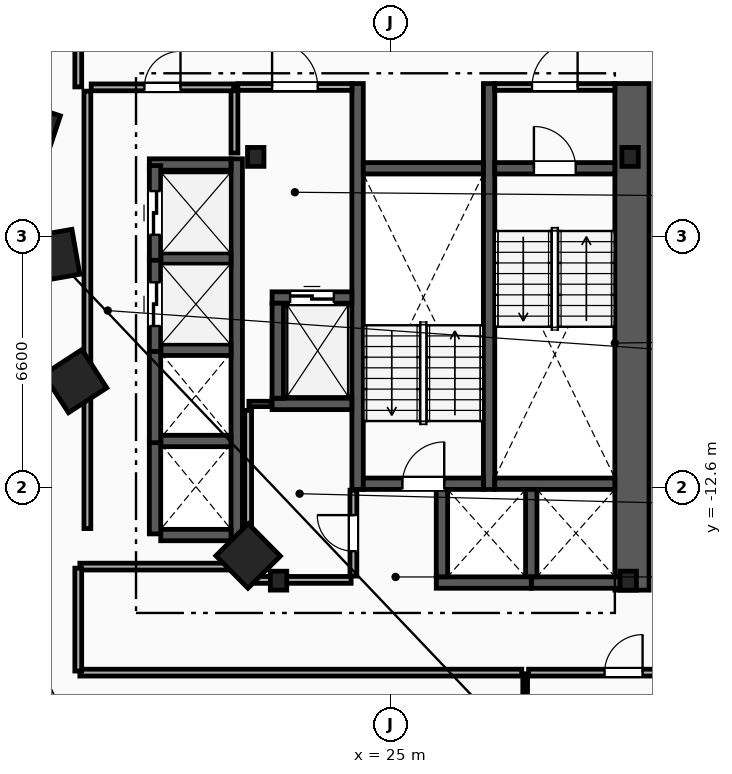
"""IFC4 building model, lengths in metres.
Left out: names, types, materials, properties, quantities, classifications, styles, units other than length and angle.
Written with IfcOpenShell. Run it as: python <this file> out.ifc"""

import sys

from ifc_helpers import new_model, si_unit, direction, frame, frame_2d, origin, origin_2d, place, context, subcontext, project, spatial, rectangle, i_section, extrude, element, fill, save


model = new_model("IFC4")
c1 = context("Model", 3, precision=1e-05, world=origin(), true_north=direction((0.0, 1.0)))
c2 = subcontext(c1, "Body", "Model", "MODEL_VIEW")
j1 = project(units=[si_unit("LENGTHUNIT", "METRE"), si_unit("PLANEANGLEUNIT", "RADIAN")], contexts=[c1])
p1 = place(None, origin())
s1 = spatial("IfcSite", under=j1, at=p1, CompositionType="ELEMENT")
p2 = place(p1, origin())
s2 = spatial("IfcBuilding", under=s1, at=p2, CompositionType="ELEMENT")
p3 = place(p2, frame((0.0, 0.0, 31.6)))
s3 = spatial("IfcBuildingStorey", under=s2, at=p3, CompositionType="ELEMENT", Elevation=31.6)
for number, where, z_axis, x_axis in (
    (1, (31.3, -3.9, 0.0), (0.0, 0.0, 1.0), (1.0, 0.0, 0.0)),
    (2, (21.45, -3.9, 0.0), (0.0, 0.0, 1.0), (1.0, 0.0, 0.0)),
    (3, (22.05, -15.05, 0.0), (0.0, 0.0, 1.0), (1.0, 0.0, 0.0)),
    (4, (31.25, -15.05, 0.0), (0.0, 0.0, 1.0), (1.0, 0.0, 0.0)),
):
    element("IfcColumn", number, at=place(p3, frame(where, z_axis=z_axis, x_axis=x_axis)), inside=s3, PredefinedType="COLUMN", context=c2, shape_type="SweptSolid", body=[
        extrude(i_section(OverallWidth=0.432, OverallDepth=0.498, WebThickness=0.056, FlangeThickness=0.089, FilletRadius=0.018, at=origin_2d()), origin(), (0.0, 0.0, 1.0), 3.8),
    ])
for number, where, z_axis, x_axis in (
    (5, (15.55, -3.2, 0.0), (0.0, 0.0, 1.0), (-0.315, -0.949, 0.0)),
    (6, (16.125, -6.5, 0.0), (0.0, 0.0, 1.0), (0.172, -0.985, 0.0)),
    (7, (16.7, -9.8, 0.0), (0.0, 0.0, 1.0), (0.544, -0.839, 0.0)),
    (8, (21.25, -14.4, 0.0), (0.0, 0.0, 1.0), (0.703, -0.711, 0.0)),
):
    element("IfcColumn", number, at=place(p3, frame(where, z_axis=z_axis, x_axis=x_axis)), inside=s3, PredefinedType="COLUMN", context=c2, shape_type="SweptSolid", body=[
        extrude(rectangle(XDim=1.2, YDim=1.2, at=origin_2d()), origin(), (0.0, 0.0, 1.0), 3.8),
    ])
p4 = place(p3, frame((31.35, -15.3, 0.0), z_axis=(0.0, 0.0, 1.0), x_axis=(0.0, 1.0, 0.0)))
e9 = element("IfcWall", 9, at=p4, inside=s3, PredefinedType="SHEAR", context=c2, shape_type="SweptSolid", body=[
    extrude(rectangle(XDim=13.33, YDim=0.9, at=frame_2d((6.665, 0.0))), origin(), (0.0, 0.0, 1.0), 3.5),
])
for number, where, z_axis, x_axis in (
    (10, (27.59, -12.65, 0.0), (0.0, 0.0, 1.0), (0.0, 1.0, 0.0)),
    (11, (24.13, -12.65, 0.0), (0.0, 0.0, 1.0), (0.0, 1.0, 0.0)),
):
    element("IfcWall", number, at=place(p3, frame(where, z_axis=z_axis, x_axis=x_axis)), inside=s3, PredefinedType="SHEAR", context=c2, shape_type="SweptSolid", body=[
        extrude(rectangle(XDim=10.68, YDim=0.3, at=frame_2d((5.34, 0.0))), origin(), (0.0, 0.0, 1.0), 3.5),
    ])
p5 = place(p3, frame((27.74, -4.2, 0.0), z_axis=(0.0, 0.0, 1.0), x_axis=(1.0, 0.0, 0.0)))
e12 = element("IfcWall", 12, at=p5, inside=s3, PredefinedType="SHEAR", context=c2, shape_type="SweptSolid", body=[
    extrude(rectangle(XDim=3.16, YDim=0.3, at=frame_2d((1.58, 0.0))), origin(), (0.0, 0.0, 1.0), 3.5),
])
p6 = place(p5, frame((1.03, 0.0, 0.0)))
e13 = element("IfcOpeningElement", 13, at=p6, cuts=e12, PredefinedType="OPENING", context=c2, shape_type="SweptSolid", body=[
    extrude(rectangle(XDim=1.1, YDim=2.15, at=frame_2d((0.55, 1.075))), frame((0.0, 0.16, 0.0), z_axis=(0.0, -1.0, 0.0), x_axis=(1.0, 0.0, 0.0)), (0.0, 0.0, 1.0), 0.32),
])
p7 = place(p3, frame((27.74, -12.5, 0.0), z_axis=(0.0, 0.0, 1.0), x_axis=(1.0, 0.0, 0.0)))
e14 = element("IfcWall", 14, at=p7, inside=s3, PredefinedType="SHEAR", context=c2, shape_type="SweptSolid", body=[
    extrude(rectangle(XDim=3.16, YDim=0.3, at=frame_2d((1.58, 0.0))), origin(), (0.0, 0.0, 1.0), 3.5),
])
p8 = place(p3, frame((24.28, -12.5, 0.0), z_axis=(0.0, 0.0, 1.0), x_axis=(1.0, 0.0, 0.0)))
e15 = element("IfcWall", 15, at=p8, inside=s3, PredefinedType="SHEAR", context=c2, shape_type="SweptSolid", body=[
    extrude(rectangle(XDim=3.16, YDim=0.3, at=frame_2d((1.58, 0.0))), origin(), (0.0, 0.0, 1.0), 3.5),
])
p9 = place(p8, frame((1.03, 0.0, 0.0)))
e16 = element("IfcOpeningElement", 16, at=p9, cuts=e15, PredefinedType="OPENING", context=c2, shape_type="SweptSolid", body=[
    extrude(rectangle(XDim=1.1, YDim=2.15, at=frame_2d((0.55, 1.075))), frame((0.0, 0.16, 0.0), z_axis=(0.0, -1.0, 0.0), x_axis=(1.0, 0.0, 0.0)), (0.0, 0.0, 1.0), 0.32),
])
p10 = place(p3, frame((24.28, -4.2, 0.0), z_axis=(0.0, 0.0, 1.0), x_axis=(1.0, 0.0, 0.0)))
e17 = element("IfcWall", 17, at=p10, inside=s3, PredefinedType="SHEAR", context=c2, shape_type="SweptSolid", body=[
    extrude(rectangle(XDim=3.16, YDim=0.3, at=frame_2d((1.58, 0.0))), origin(), (0.0, 0.0, 1.0), 3.5),
])
p11 = place(p3, frame((20.89, -3.8, 0.0), z_axis=(0.0, 0.0, 1.0), x_axis=(0.0, 1.0, 0.0)))
e18 = element("IfcWall", 18, at=p11, inside=s3, PredefinedType="PARTITIONING", context=c2, shape_type="SweptSolid", body=[
    extrude(rectangle(XDim=1.65, YDim=0.18, at=frame_2d((0.825, 0.0))), origin(), (0.0, 0.0, 1.0), 3.5),
])
p12 = place(p3, frame((20.98, -2.06, 0.0), z_axis=(0.0, 0.0, 1.0), x_axis=(1.0, 0.0, 0.0)))
e19 = element("IfcWall", 19, at=p12, inside=s3, PredefinedType="PARTITIONING", context=c2, shape_type="SweptSolid", body=[
    extrude(rectangle(XDim=3.0, YDim=0.18, at=frame_2d((1.5, 0.0))), origin(), (0.0, 0.0, 1.0), 3.5),
])
p13 = place(p12, frame((0.9, 0.0, 0.0)))
e20 = element("IfcOpeningElement", 20, at=p13, cuts=e19, PredefinedType="OPENING", context=c2, shape_type="SweptSolid", body=[
    extrude(rectangle(XDim=1.2, YDim=2.15, at=frame_2d((0.6, 1.075))), frame((0.0, 0.1, 0.0), z_axis=(0.0, -1.0, 0.0), x_axis=(1.0, 0.0, 0.0)), (0.0, 0.0, 1.0), 0.2),
])
p14 = place(p3, frame((27.74, -2.06, 0.0), z_axis=(0.0, 0.0, 1.0), x_axis=(1.0, 0.0, 0.0)))
e21 = element("IfcWall", 21, at=p14, inside=s3, PredefinedType="PARTITIONING", context=c2, shape_type="SweptSolid", body=[
    extrude(rectangle(XDim=3.16, YDim=0.18, at=frame_2d((1.58, 0.0))), origin(), (0.0, 0.0, 1.0), 3.5),
])
p15 = place(p14, frame((0.98, 0.0, 0.0)))
e22 = element("IfcOpeningElement", 22, at=p15, cuts=e21, PredefinedType="OPENING", context=c2, shape_type="SweptSolid", body=[
    extrude(rectangle(XDim=1.2, YDim=2.15, at=frame_2d((0.6, 1.075))), frame((0.0, 0.1, 0.0), z_axis=(0.0, -1.0, 0.0), x_axis=(1.0, 0.0, 0.0)), (0.0, 0.0, 1.0), 0.2),
])
p16 = place(p3, frame((21.88, -7.6, 0.0), z_axis=(0.0, 0.0, 1.0), x_axis=(1.0, 0.0, 0.0)))
e23 = element("IfcWall", 23, at=p16, inside=s3, PredefinedType="SHEAR", context=c2, shape_type="SweptSolid", body=[
    extrude(rectangle(XDim=2.1, YDim=0.3, at=frame_2d((1.05, 0.0))), origin(), (0.0, 0.0, 1.0), 3.5),
])
p17 = place(p16, frame((0.475, 0.0, 0.0)))
e24 = element("IfcOpeningElement", 24, at=p17, cuts=e23, PredefinedType="OPENING", context=c2, shape_type="SweptSolid", body=[
    extrude(rectangle(XDim=1.15, YDim=2.2, at=frame_2d((0.575, 1.1))), frame((0.0, 0.16, 0.0), z_axis=(0.0, -1.0, 0.0), x_axis=(1.0, 0.0, 0.0)), (0.0, 0.0, 1.0), 0.32),
])
p18 = place(p3, frame((21.88, -10.4, 0.0), z_axis=(0.0, 0.0, 1.0), x_axis=(1.0, 0.0, 0.0)))
e25 = element("IfcWall", 25, at=p18, inside=s3, PredefinedType="SHEAR", context=c2, shape_type="SweptSolid", body=[
    extrude(rectangle(XDim=2.1, YDim=0.3, at=frame_2d((1.05, 0.0))), origin(), (0.0, 0.0, 1.0), 3.5),
])
for number, where, z_axis, x_axis in (
    (26, (22.03, -10.25, 0.0), (0.0, 0.0, 1.0), (0.0, 1.0, 0.0)),
    (27, (28.7, -15.1, 0.0), (0.0, 0.0, 1.0), (1.0, 0.0, 0.0)),
):
    element("IfcWall", number, at=place(p3, frame(where, z_axis=z_axis, x_axis=x_axis)), inside=s3, PredefinedType="SHEAR", context=c2, shape_type="SweptSolid", body=[
        extrude(rectangle(XDim=2.5, YDim=0.3, at=frame_2d((1.25, 0.0))), origin(), (0.0, 0.0, 1.0), 3.5),
    ])
p19 = place(p3, frame((28.7, -14.95, 0.0), z_axis=(0.0, 0.0, 1.0), x_axis=(0.0, 1.0, 0.0)))
e28 = element("IfcWall", 28, at=p19, inside=s3, PredefinedType="SHEAR", context=c2, shape_type="SweptSolid", body=[
    extrude(rectangle(XDim=2.3, YDim=0.3, at=frame_2d((1.15, 0.0))), origin(), (0.0, 0.0, 1.0), 3.5),
])
p20 = place(p3, frame((26.2, -15.1, 0.0), z_axis=(0.0, 0.0, 1.0), x_axis=(1.0, 0.0, 0.0)))
e29 = element("IfcWall", 29, at=p20, inside=s3, PredefinedType="SHEAR", context=c2, shape_type="SweptSolid", body=[
    extrude(rectangle(XDim=2.5, YDim=0.3, at=frame_2d((1.25, 0.0))), origin(), (0.0, 0.0, 1.0), 3.5),
])
p21 = place(p3, frame((26.35, -14.95, 0.0), z_axis=(0.0, 0.0, 1.0), x_axis=(0.0, 1.0, 0.0)))
e30 = element("IfcWall", 30, at=p21, inside=s3, PredefinedType="SHEAR", context=c2, shape_type="SweptSolid", body=[
    extrude(rectangle(XDim=2.3, YDim=0.3, at=frame_2d((1.15, 0.0))), origin(), (0.0, 0.0, 1.0), 3.5),
])
p22 = place(p3, frame((20.95, -14.0, 0.0), z_axis=(0.0, 0.0, 1.0), x_axis=(0.0, 1.0, 0.0)))
e31 = element("IfcWall", 31, at=p22, inside=s3, PredefinedType="SHEAR", context=c2, shape_type="SweptSolid", body=[
    extrude(rectangle(XDim=10.05, YDim=0.3, at=frame_2d((5.025, 0.0))), origin(), (0.0, 0.0, 1.0), 3.5),
])
p23 = place(p3, frame((18.95, -13.85, 0.0), z_axis=(0.0, 0.0, 1.0), x_axis=(1.0, 0.0, 0.0)))
e32 = element("IfcWall", 32, at=p23, inside=s3, PredefinedType="SHEAR", context=c2, shape_type="SweptSolid", body=[
    extrude(rectangle(XDim=1.85, YDim=0.3, at=frame_2d((0.925, 0.0))), origin(), (0.0, 0.0, 1.0), 3.5),
])
p24 = place(p3, frame((18.65, -4.1, 0.0), z_axis=(0.0, 0.0, 1.0), x_axis=(1.0, 0.0, 0.0)))
e33 = element("IfcWall", 33, at=p24, inside=s3, PredefinedType="SHEAR", context=c2, shape_type="SweptSolid", body=[
    extrude(rectangle(XDim=2.15, YDim=0.3, at=frame_2d((1.075, 0.0))), origin(), (0.0, 0.0, 1.0), 3.5),
])
for number, where, z_axis, x_axis in (
    (34, (18.95, -11.375, 0.0), (0.0, 0.0, 1.0), (1.0, 0.0, 0.0)),
    (35, (18.95, -8.975, 0.0), (0.0, 0.0, 1.0), (1.0, 0.0, 0.0)),
    (36, (18.95, -6.575, 0.0), (0.0, 0.0, 1.0), (1.0, 0.0, 0.0)),
):
    element("IfcWall", number, at=place(p3, frame(where, z_axis=z_axis, x_axis=x_axis)), inside=s3, PredefinedType="SHEAR", context=c2, shape_type="SweptSolid", body=[
        extrude(rectangle(XDim=1.85, YDim=0.3, at=frame_2d((0.925, 0.0))), origin(), (0.0, 0.0, 1.0), 3.5),
    ])
for number, where, z_axis, x_axis in (
    (37, (18.8, -13.82, 0.0), (0.0, 0.0, 1.0), (0.0, 1.0, 0.0)),
    (38, (18.8, -11.42, 0.0), (0.0, 0.0, 1.0), (0.0, 1.0, 0.0)),
):
    element("IfcWall", number, at=place(p3, frame(where, z_axis=z_axis, x_axis=x_axis)), inside=s3, PredefinedType="SHEAR", context=c2, shape_type="SweptSolid", body=[
        extrude(rectangle(XDim=2.49, YDim=0.3, at=frame_2d((1.245, 0.0))), origin(), (0.0, 0.0, 1.0), 3.5),
    ])
p25 = place(p3, frame((18.8, -9.02, 0.0), z_axis=(0.0, 0.0, 1.0), x_axis=(0.0, 1.0, 0.0)))
e39 = element("IfcWall", 39, at=p25, inside=s3, PredefinedType="SHEAR", context=c2, shape_type="SweptSolid", body=[
    extrude(rectangle(XDim=2.49, YDim=0.3, at=frame_2d((1.245, 0.0))), origin(), (0.0, 0.0, 1.0), 3.5),
])
p26 = place(p25, frame((0.67, 0.0, 0.0)))
e40 = element("IfcOpeningElement", 40, at=p26, cuts=e39, PredefinedType="OPENING", context=c2, shape_type="SweptSolid", body=[
    extrude(rectangle(XDim=1.15, YDim=2.2, at=frame_2d((0.575, 1.1))), frame((0.0, 0.16, 0.0), z_axis=(0.0, -1.0, 0.0), x_axis=(1.0, 0.0, 0.0)), (0.0, 0.0, 1.0), 0.32),
])
p27 = place(p3, frame((18.8, -6.62, 0.0), z_axis=(0.0, 0.0, 1.0), x_axis=(0.0, 1.0, 0.0)))
e41 = element("IfcWall", 41, at=p27, inside=s3, PredefinedType="SHEAR", context=c2, shape_type="SweptSolid", body=[
    extrude(rectangle(XDim=2.49, YDim=0.3, at=frame_2d((1.245, 0.0))), origin(), (0.0, 0.0, 1.0), 3.5),
])
p28 = place(p27, frame((0.67, 0.0, 0.0)))
e42 = element("IfcOpeningElement", 42, at=p28, cuts=e41, PredefinedType="OPENING", context=c2, shape_type="SweptSolid", body=[
    extrude(rectangle(XDim=1.15, YDim=2.2, at=frame_2d((0.575, 1.1))), frame((0.0, 0.16, 0.0), z_axis=(0.0, -1.0, 0.0), x_axis=(1.0, 0.0, 0.0)), (0.0, 0.0, 1.0), 0.32),
])
p29 = place(p3, frame((17.02, -13.68, 0.0), z_axis=(0.0, 0.0, 1.0), x_axis=(0.0, 1.0, 0.0)))
e43 = element("IfcWall", 43, at=p29, inside=s3, PredefinedType="PARTITIONING", context=c2, shape_type="SweptSolid", body=[
    extrude(rectangle(XDim=11.51, YDim=0.18, at=frame_2d((5.755, 0.0))), origin(), (0.0, 0.0, 1.0), 3.5),
])
p30 = place(p3, frame((17.12, -2.07, 0.0), z_axis=(0.0, 0.0, 1.0), x_axis=(1.0, 0.0, 0.0)))
e44 = element("IfcWall", 44, at=p30, inside=s3, PredefinedType="PARTITIONING", context=c2, shape_type="SweptSolid", body=[
    extrude(rectangle(XDim=3.75, YDim=0.18, at=frame_2d((1.875, 0.0))), origin(), (0.0, 0.0, 1.0), 3.5),
])
p31 = place(p30, frame((1.4, 0.0, 0.0)))
e45 = element("IfcOpeningElement", 45, at=p31, cuts=e44, PredefinedType="OPENING", context=c2, shape_type="SweptSolid", body=[
    extrude(rectangle(XDim=0.95, YDim=2.1, at=frame_2d((0.475, 1.05))), frame((0.0, 0.1, 0.0), z_axis=(0.0, -1.0, 0.0), x_axis=(1.0, 0.0, 0.0)), (0.0, 0.0, 1.0), 0.2),
])
p32 = place(p3, frame((21.27, -10.4, 0.0), z_axis=(0.0, 0.0, 1.0), x_axis=(1.0, 0.0, 0.0)))
e46 = element("IfcWall", 46, at=p32, inside=s3, PredefinedType="PARTITIONING", context=c2, shape_type="SweptSolid", body=[
    extrude(rectangle(XDim=0.59, YDim=0.14, at=frame_2d((0.295, 0.0))), origin(), (0.0, 0.0, 1.0), 3.5),
])
p33 = place(p3, frame((21.25, -14.93, 0.0), z_axis=(0.0, 0.0, 1.0), x_axis=(0.0, 1.0, 0.0)))
e47 = element("IfcWall", 47, at=p33, inside=s3, PredefinedType="PARTITIONING", context=c2, shape_type="SweptSolid", body=[
    extrude(rectangle(XDim=4.36, YDim=0.18, at=frame_2d((2.18, 0.0))), origin(), (0.0, 0.0, 1.0), 3.5),
])
p34 = place(p3, frame((21.35, -15.03, 0.0), z_axis=(0.0, 0.0, 1.0), x_axis=(1.0, 0.0, 0.0)))
e48 = element("IfcWall", 48, at=p34, inside=s3, PredefinedType="PARTITIONING", context=c2, shape_type="SweptSolid", body=[
    extrude(rectangle(XDim=2.61, YDim=0.18, at=frame_2d((1.305, 0.0))), origin(), (0.0, 0.0, 1.0), 2.573),
])
p35 = place(p3, frame((24.02, -14.93, 0.0), z_axis=(0.0, 0.0, 1.0), x_axis=(0.0, 1.0, 0.0)))
e49 = element("IfcWall", 49, at=p35, inside=s3, PredefinedType="PARTITIONING", context=c2, shape_type="SweptSolid", body=[
    extrude(rectangle(XDim=2.26, YDim=0.18, at=frame_2d((1.13, 0.0))), origin(), (0.0, 0.0, 1.0), 3.5),
])
p36 = place(p35, frame((0.655, 0.0, 0.0)))
e50 = element("IfcOpeningElement", 50, at=p36, cuts=e49, PredefinedType="OPENING", context=c2, shape_type="SweptSolid", body=[
    extrude(rectangle(XDim=0.95, YDim=2.1, at=frame_2d((0.475, 1.05))), frame((0.0, 0.1, 0.0), z_axis=(0.0, -1.0, 0.0), x_axis=(1.0, 0.0, 0.0)), (0.0, 0.0, 1.0), 0.2),
])
p37 = place(p3, frame((28.54, -25.794, 0.0), z_axis=(0.0, 0.0, 1.0), x_axis=(0.0, 1.0, 0.0)))
e51 = element("IfcWall", 51, at=p37, inside=s3, PredefinedType="PARTITIONING", context=c2, shape_type="SweptSolid", body=[
    extrude(rectangle(XDim=8.294, YDim=0.125, at=frame_2d((4.147, 0.0))), origin(), (0.0, 0.0, 1.0), 3.5),
])
p38 = place(p3, frame((28.63, -17.47, 0.0), z_axis=(0.0, 0.0, 1.0), x_axis=(1.0, 0.0, 0.0)))
e52 = element("IfcWall", 52, at=p38, inside=s3, PredefinedType="PARTITIONING", context=c2, shape_type="SweptSolid", body=[
    extrude(rectangle(XDim=4.999, YDim=0.18, at=frame_2d((2.499, 0.0))), origin(), (0.0, 0.0, 1.0), 3.5),
])
p39 = place(p38, frame((1.999, 0.0, 0.0)))
e53 = element("IfcOpeningElement", 53, at=p39, cuts=e52, PredefinedType="OPENING", context=c2, shape_type="SweptSolid", body=[
    extrude(rectangle(XDim=1.0, YDim=2.15, at=frame_2d((0.5, 1.075))), frame((0.0, 0.1, 0.0), z_axis=(0.0, -1.0, 0.0), x_axis=(1.0, 0.0, 0.0)), (0.0, 0.0, 1.0), 0.2),
])
p40 = place(p3, frame((16.822, -17.47, 0.0), z_axis=(0.0, 0.0, 1.0), x_axis=(1.0, 0.0, 0.0)))
e54 = element("IfcWall", 54, at=p40, inside=s3, PredefinedType="PARTITIONING", context=c2, shape_type="SweptSolid", body=[
    extrude(rectangle(XDim=11.628, YDim=0.18, at=frame_2d((5.814, 0.0))), origin(), (0.0, 0.0, 1.0), 3.5),
])
p41 = place(p3, frame((21.178, -14.68, 0.0), z_axis=(0.0, 0.0, 1.0), x_axis=(-1.0, 0.0, 0.0)))
e55 = element("IfcWall", 55, at=p41, inside=s3, PredefinedType="PARTITIONING", context=c2, shape_type="SweptSolid", body=[
    extrude(rectangle(XDim=4.357, YDim=0.18, at=frame_2d((2.178, 0.0))), origin(), (0.0, 0.0, 1.0), 3.5),
])
p42 = place(p3, frame((16.78, -14.721, 0.0), z_axis=(0.0, 0.0, 1.0), x_axis=(0.0, -1.0, 0.0)))
e56 = element("IfcWall", 56, at=p42, inside=s3, PredefinedType="PARTITIONING", context=c2, shape_type="SweptSolid", body=[
    extrude(rectangle(XDim=2.707, YDim=0.18, at=frame_2d((1.354, 0.0))), origin(), (0.0, 0.0, 1.0), 3.5),
])
p43 = place(p3, frame((16.78, 0.329, 0.0), z_axis=(0.0, 0.0, 1.0), x_axis=(0.0, -1.0, 0.0)))
e57 = element("IfcWall", 57, at=p43, inside=s3, PredefinedType="PARTITIONING", context=c2, shape_type="SweptSolid", body=[
    extrude(rectangle(XDim=2.387, YDim=0.18, at=frame_2d((1.194, 0.0))), origin(), (0.0, 0.0, 1.0), 3.5),
])
p44 = place(p6, origin())
e58 = element("IfcDoor", 58, at=p44, inside=s3, OperationType="SINGLE_SWING_LEFT", PredefinedType="DOOR", context=c2, shape_type="SweptSolid", body=[
    extrude(rectangle(XDim=1.1, YDim=2.15, at=frame_2d((0.55, 1.075))), frame((0.0, 0.025, 0.0), z_axis=(0.0, -1.0, 0.0), x_axis=(1.0, 0.0, 0.0)), (0.0, 0.0, 1.0), 0.05),
])
fill(e13, e58)
p45 = place(p9, origin())
e59 = element("IfcDoor", 59, at=p45, inside=s3, OperationType="SINGLE_SWING_RIGHT", PredefinedType="DOOR", context=c2, shape_type="SweptSolid", body=[
    extrude(rectangle(XDim=1.1, YDim=2.15, at=frame_2d((0.55, 1.075))), frame((0.0, 0.025, 0.0), z_axis=(0.0, -1.0, 0.0), x_axis=(1.0, 0.0, 0.0)), (0.0, 0.0, 1.0), 0.05),
])
fill(e16, e59)
p46 = place(p13, origin())
e60 = element("IfcDoor", 60, at=p46, inside=s3, OperationType="SINGLE_SWING_LEFT", PredefinedType="DOOR", context=c2, shape_type="SweptSolid", body=[
    extrude(rectangle(XDim=1.2, YDim=2.15, at=frame_2d((0.6, 1.075))), frame((0.0, 0.025, 0.0), z_axis=(0.0, -1.0, 0.0), x_axis=(1.0, 0.0, 0.0)), (0.0, 0.0, 1.0), 0.05),
])
fill(e20, e60)
p47 = place(p15, origin())
e61 = element("IfcDoor", 61, at=p47, inside=s3, OperationType="SINGLE_SWING_RIGHT", PredefinedType="DOOR", context=c2, shape_type="SweptSolid", body=[
    extrude(rectangle(XDim=1.2, YDim=2.15, at=frame_2d((0.6, 1.075))), frame((0.0, 0.025, 0.0), z_axis=(0.0, -1.0, 0.0), x_axis=(1.0, 0.0, 0.0)), (0.0, 0.0, 1.0), 0.05),
])
fill(e22, e61)
p48 = place(p17, origin())
e62 = element("IfcDoor", 62, at=p48, inside=s3, OperationType="SLIDING_TO_LEFT", PredefinedType="TRAPDOOR", context=c2, shape_type="SweptSolid", body=[
    extrude(rectangle(XDim=1.15, YDim=2.2, at=frame_2d((0.575, 1.1))), frame((0.0, 0.025, 0.0), z_axis=(0.0, -1.0, 0.0), x_axis=(1.0, 0.0, 0.0)), (0.0, 0.0, 1.0), 0.05),
])
fill(e24, e62)
p49 = place(p26, origin())
e63 = element("IfcDoor", 63, at=p49, inside=s3, OperationType="SLIDING_TO_LEFT", PredefinedType="TRAPDOOR", context=c2, shape_type="SweptSolid", body=[
    extrude(rectangle(XDim=1.15, YDim=2.2, at=frame_2d((0.575, 1.1))), frame((0.0, 0.025, 0.0), z_axis=(0.0, -1.0, 0.0), x_axis=(1.0, 0.0, 0.0)), (0.0, 0.0, 1.0), 0.05),
])
fill(e40, e63)
p50 = place(p28, origin())
e64 = element("IfcDoor", 64, at=p50, inside=s3, OperationType="SLIDING_TO_LEFT", PredefinedType="TRAPDOOR", context=c2, shape_type="SweptSolid", body=[
    extrude(rectangle(XDim=1.15, YDim=2.2, at=frame_2d((0.575, 1.1))), frame((0.0, 0.025, 0.0), z_axis=(0.0, -1.0, 0.0), x_axis=(1.0, 0.0, 0.0)), (0.0, 0.0, 1.0), 0.05),
])
fill(e42, e64)
p51 = place(p39, origin())
e65 = element("IfcDoor", 65, at=p51, inside=s3, OperationType="SINGLE_SWING_RIGHT", PredefinedType="DOOR", context=c2, shape_type="SweptSolid", body=[
    extrude(rectangle(XDim=1.0, YDim=2.15, at=frame_2d((0.5, 1.075))), frame((0.0, 0.025, 0.0), z_axis=(0.0, -1.0, 0.0), x_axis=(1.0, 0.0, 0.0)), (0.0, 0.0, 1.0), 0.05),
])
fill(e53, e65)
p52 = place(p31, origin())
e66 = element("IfcDoor", 66, at=p52, inside=s3, OperationType="SINGLE_SWING_RIGHT", PredefinedType="DOOR", context=c2, shape_type="SweptSolid", body=[
    extrude(rectangle(XDim=0.95, YDim=2.1, at=frame_2d((0.475, 1.05))), frame((0.0, 0.025, 0.0), z_axis=(0.0, -1.0, 0.0), x_axis=(1.0, 0.0, 0.0)), (0.0, 0.0, 1.0), 0.05),
])
fill(e45, e66)
p53 = place(p36, origin())
e67 = element("IfcDoor", 67, at=p53, inside=s3, OperationType="SINGLE_SWING_RIGHT", PredefinedType="DOOR", context=c2, shape_type="SweptSolid", body=[
    extrude(rectangle(XDim=0.95, YDim=2.1, at=frame_2d((0.475, 1.05))), frame((0.0, 0.025, 0.0), z_axis=(0.0, -1.0, 0.0), x_axis=(1.0, 0.0, 0.0)), (0.0, 0.0, 1.0), 0.05),
])
fill(e50, e67)
save(model, sys.argv[1])
